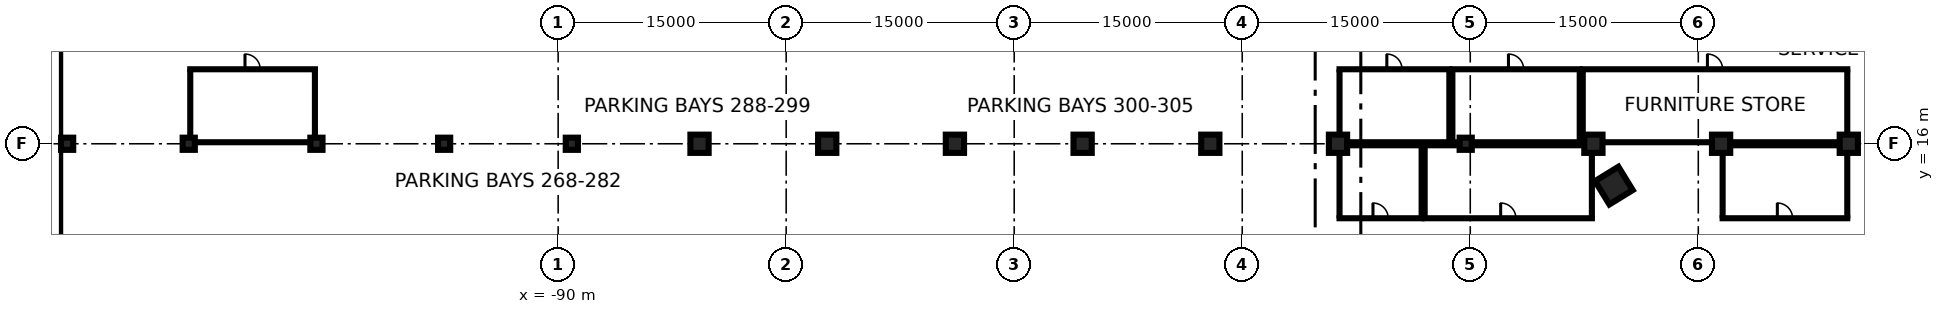
"""IFC4 building model, lengths in metres.
Left out: names, types, materials, properties, quantities, classifications, styles, units other than length and angle.
Written with IfcOpenShell. Run it as: python <this file> out.ifc"""

import sys

from ifc_helpers import new_model, si_unit, direction, frame, frame_2d, origin, origin_2d, place, context, subcontext, project, spatial, rectangle, extrude, element, fill, save


model = new_model("IFC4")
c1 = context("Model", 3, precision=1e-05, world=origin(), true_north=direction((0.0, 1.0)))
c2 = subcontext(c1, "Body", "Model", "MODEL_VIEW")
j1 = project(units=[si_unit("LENGTHUNIT", "METRE"), si_unit("PLANEANGLEUNIT", "RADIAN")], contexts=[c1])
p1 = place(None, origin())
s1 = spatial("IfcSite", under=j1, at=p1, CompositionType="ELEMENT")
p2 = place(p1, origin())
s2 = spatial("IfcBuilding", under=s1, at=p2, CompositionType="ELEMENT")
p3 = place(p2, frame((0.0, 0.0, -12.0)))
s3 = spatial("IfcBuildingStorey", under=s2, at=p3, CompositionType="ELEMENT", Elevation=-12.0)
p4 = place(p3, frame((-123.15, -80.0, 0.0), z_axis=(0.0, 0.0, 1.0), x_axis=(0.0, 1.0, 0.0)))
e1 = element("IfcWall", 1, at=p4, inside=s3, PredefinedType="USERDEFINED", context=c2, shape_type="SweptSolid", body=[
    extrude(rectangle(XDim=160.0, YDim=0.9, at=frame_2d((80.0, 0.0))), origin(), (0.0, 0.0, 1.0), 11.55),
])
p5 = place(p2, frame((0.0, 0.0, -3.6)))
s4 = spatial("IfcBuildingStorey", under=s2, at=p5, CompositionType="ELEMENT", Elevation=-3.6)
p6 = place(p5, frame((-20.552, 13.248, -0.4), z_axis=(0.0, 0.0, 1.0), x_axis=(-0.523429826947, 0.85206878611, 0.0)))
e2 = element("IfcColumn", 2, at=p6, inside=s4, PredefinedType="COLUMN", context=c2, shape_type="SweptSolid", body=[
    extrude(rectangle(XDim=1.8, YDim=1.8, at=origin_2d()), origin(), (0.0, 0.0, 1.0), 3.55),
])
for number, where, z_axis, x_axis in (
    (3, (-122.3, 16.0, -0.4), (0.0, 0.0, 1.0), (1.0, 0.0, 0.0)),
    (4, (-114.3, 16.0, -0.4), (0.0, 0.0, 1.0), (1.0, 0.0, 0.0)),
    (5, (-105.9, 16.0, -0.4), (0.0, 0.0, 1.0), (1.0, 0.0, 0.0)),
    (6, (-97.5, 16.0, -0.4), (0.0, 0.0, 1.0), (1.0, 0.0, 0.0)),
    (7, (-89.1, 16.0, -0.4), (0.0, 0.0, 1.0), (1.0, 0.0, 0.0)),
):
    element("IfcColumn", number, at=place(p5, frame(where, z_axis=z_axis, x_axis=x_axis)), inside=s4, PredefinedType="COLUMN", context=c2, shape_type="SweptSolid", body=[
        extrude(rectangle(XDim=0.8, YDim=0.8, at=origin_2d()), origin(), (0.0, 0.0, 1.0), 3.55),
    ])
for number, where, z_axis, x_axis in (
    (8, (-80.7, 16.0, -0.4), (0.0, 0.0, 1.0), (1.0, 0.0, 0.0)),
    (9, (-72.3, 16.0, -0.4), (0.0, 0.0, 1.0), (1.0, 0.0, 0.0)),
    (10, (-63.9, 16.0, -0.4), (0.0, 0.0, 1.0), (1.0, 0.0, 0.0)),
    (11, (-55.5, 16.0, -0.4), (0.0, 0.0, 1.0), (1.0, 0.0, 0.0)),
    (12, (-47.1, 16.0, -0.4), (0.0, 0.0, 1.0), (1.0, 0.0, 0.0)),
    (13, (-38.7, 16.0, -0.4), (0.0, 0.0, 1.0), (1.0, 0.0, 0.0)),
):
    element("IfcColumn", number, at=place(p5, frame(where, z_axis=z_axis, x_axis=x_axis)), inside=s4, PredefinedType="COLUMN", context=c2, shape_type="SweptSolid", body=[
        extrude(rectangle(XDim=1.2, YDim=1.2, at=origin_2d()), origin(), (0.0, 0.0, 1.0), 3.55),
    ])
p7 = place(p5, frame((-30.3, 16.0, -0.4), z_axis=(0.0, 0.0, 1.0), x_axis=(1.0, 0.0, 0.0)))
e14 = element("IfcColumn", 14, at=p7, inside=s4, PredefinedType="COLUMN", context=c2, shape_type="SweptSolid", body=[
    extrude(rectangle(XDim=0.8, YDim=0.8, at=origin_2d()), origin(), (0.0, 0.0, 1.0), 3.55),
])
for number, where, z_axis, x_axis in (
    (15, (-21.9, 16.0, -0.4), (0.0, 0.0, 1.0), (1.0, 0.0, 0.0)),
    (16, (-13.5, 16.0, -0.4), (0.0, 0.0, 1.0), (1.0, 0.0, 0.0)),
    (17, (-5.1, 16.0, -0.4), (0.0, 0.0, 1.0), (1.0, 0.0, 0.0)),
):
    element("IfcColumn", number, at=place(p5, frame(where, z_axis=z_axis, x_axis=x_axis)), inside=s4, PredefinedType="COLUMN", context=c2, shape_type="SweptSolid", body=[
        extrude(rectangle(XDim=1.2, YDim=1.2, at=origin_2d()), origin(), (0.0, 0.0, 1.0), 3.55),
    ])
p8 = place(p5, frame((-38.7, 11.1, 0.0), z_axis=(0.0, 0.0, 1.0), x_axis=(1.0, 0.0, 0.0)))
e18 = element("IfcWall", 18, at=p8, inside=s4, PredefinedType="PARTITIONING", context=c2, shape_type="SweptSolid", body=[
    extrude(rectangle(XDim=5.6, YDim=0.2, at=frame_2d((2.8, 0.0))), origin(), (0.0, 0.0, 1.0), 3.15),
])
p9 = place(p8, frame((2.3, 0.0, 0.0)))
e19 = element("IfcOpeningElement", 19, at=p9, cuts=e18, PredefinedType="OPENING", context=c2, shape_type="SweptSolid", body=[
    extrude(rectangle(XDim=1.0, YDim=2.1, at=frame_2d((0.5, 1.05))), frame((0.0, 0.11, 0.0), z_axis=(0.0, -1.0, 0.0), x_axis=(1.0, 0.0, 0.0)), (0.0, 0.0, 1.0), 0.22),
])
p10 = place(p5, frame((-38.7, 15.9, 0.0), z_axis=(0.0, 0.0, 1.0), x_axis=(1.0, 0.0, 0.0)))
e20 = element("IfcWall", 20, at=p10, inside=s4, PredefinedType="PARTITIONING", context=c2, shape_type="SweptSolid", body=[
    extrude(rectangle(XDim=5.6, YDim=0.2, at=frame_2d((2.8, 0.0))), origin(), (0.0, 0.0, 1.0), 3.15),
])
p11 = place(p5, frame((-38.6, 11.2, 0.0), z_axis=(0.0, 0.0, 1.0), x_axis=(0.0, 1.0, 0.0)))
e21 = element("IfcWall", 21, at=p11, inside=s4, PredefinedType="PARTITIONING", context=c2, shape_type="SweptSolid", body=[
    extrude(rectangle(XDim=4.2, YDim=0.2, at=frame_2d((2.1, 0.0))), origin(), (0.0, 0.0, 1.0), 3.15),
])
p12 = place(p5, frame((-33.2, 11.2, 0.0), z_axis=(0.0, 0.0, 1.0), x_axis=(0.0, 1.0, 0.0)))
e22 = element("IfcWall", 22, at=p12, inside=s4, PredefinedType="PARTITIONING", context=c2, shape_type="SweptSolid", body=[
    extrude(rectangle(XDim=4.6, YDim=0.2, at=frame_2d((2.3, 0.0))), origin(), (0.0, 0.0, 1.0), 3.15),
])
p13 = place(p5, frame((-33.1, 11.1, 0.0), z_axis=(0.0, 0.0, 1.0), x_axis=(1.0, 0.0, 0.0)))
e23 = element("IfcWall", 23, at=p13, inside=s4, PredefinedType="PARTITIONING", context=c2, shape_type="SweptSolid", body=[
    extrude(rectangle(XDim=11.2, YDim=0.2, at=frame_2d((5.6, 0.0))), origin(), (0.0, 0.0, 1.0), 3.15),
])
p14 = place(p13, frame((5.1, 0.0, 0.0)))
e24 = element("IfcOpeningElement", 24, at=p14, cuts=e23, PredefinedType="OPENING", context=c2, shape_type="SweptSolid", body=[
    extrude(rectangle(XDim=1.0, YDim=2.1, at=frame_2d((0.5, 1.05))), frame((0.0, 0.11, 0.0), z_axis=(0.0, -1.0, 0.0), x_axis=(1.0, 0.0, 0.0)), (0.0, 0.0, 1.0), 0.22),
])
p15 = place(p5, frame((-33.1, 15.9, 0.0), z_axis=(0.0, 0.0, 1.0), x_axis=(1.0, 0.0, 0.0)))
e25 = element("IfcWall", 25, at=p15, inside=s4, PredefinedType="PARTITIONING", context=c2, shape_type="SweptSolid", body=[
    extrude(rectangle(XDim=11.2, YDim=0.2, at=frame_2d((5.6, 0.0))), origin(), (0.0, 0.0, 1.0), 3.15),
])
p16 = place(p5, frame((-33.0, 11.2, 0.0), z_axis=(0.0, 0.0, 1.0), x_axis=(0.0, 1.0, 0.0)))
e26 = element("IfcWall", 26, at=p16, inside=s4, PredefinedType="PARTITIONING", context=c2, shape_type="SweptSolid", body=[
    extrude(rectangle(XDim=4.6, YDim=0.2, at=frame_2d((2.3, 0.0))), origin(), (0.0, 0.0, 1.0), 3.15),
])
p17 = place(p5, frame((-22.0, 11.2, 0.0), z_axis=(0.0, 0.0, 1.0), x_axis=(0.0, 1.0, 0.0)))
e27 = element("IfcWall", 27, at=p17, inside=s4, PredefinedType="PARTITIONING", context=c2, shape_type="SweptSolid", body=[
    extrude(rectangle(XDim=4.2, YDim=0.2, at=frame_2d((2.1, 0.0))), origin(), (0.0, 0.0, 1.0), 3.15),
])
p18 = place(p5, frame((-13.5, 11.1, 0.0), z_axis=(0.0, 0.0, 1.0), x_axis=(1.0, 0.0, 0.0)))
e28 = element("IfcWall", 28, at=p18, inside=s4, PredefinedType="PARTITIONING", context=c2, shape_type="SweptSolid", body=[
    extrude(rectangle(XDim=8.4, YDim=0.2, at=frame_2d((4.2, 0.0))), origin(), (0.0, 0.0, 1.0), 3.15),
])
p19 = place(p18, frame((3.7, 0.0, 0.0)))
e29 = element("IfcOpeningElement", 29, at=p19, cuts=e28, PredefinedType="OPENING", context=c2, shape_type="SweptSolid", body=[
    extrude(rectangle(XDim=1.0, YDim=2.1, at=frame_2d((0.5, 1.05))), frame((0.0, 0.11, 0.0), z_axis=(0.0, -1.0, 0.0), x_axis=(1.0, 0.0, 0.0)), (0.0, 0.0, 1.0), 0.22),
])
p20 = place(p5, frame((-13.5, 15.9, 0.0), z_axis=(0.0, 0.0, 1.0), x_axis=(1.0, 0.0, 0.0)))
e30 = element("IfcWall", 30, at=p20, inside=s4, PredefinedType="PARTITIONING", context=c2, shape_type="SweptSolid", body=[
    extrude(rectangle(XDim=8.4, YDim=0.2, at=frame_2d((4.2, 0.0))), origin(), (0.0, 0.0, 1.0), 3.15),
])
for number, where, z_axis, x_axis in (
    (31, (-13.4, 11.2, 0.0), (0.0, 0.0, 1.0), (0.0, 1.0, 0.0)),
    (32, (-5.2, 11.2, 0.0), (0.0, 0.0, 1.0), (0.0, 1.0, 0.0)),
):
    element("IfcWall", number, at=place(p5, frame(where, z_axis=z_axis, x_axis=x_axis)), inside=s4, PredefinedType="PARTITIONING", context=c2, shape_type="SweptSolid", body=[
        extrude(rectangle(XDim=4.2, YDim=0.2, at=frame_2d((2.1, 0.0))), origin(), (0.0, 0.0, 1.0), 3.15),
    ])
p21 = place(p5, frame((-38.7, 16.1, 0.0), z_axis=(0.0, 0.0, 1.0), x_axis=(1.0, 0.0, 0.0)))
e33 = element("IfcWall", 33, at=p21, inside=s4, PredefinedType="PARTITIONING", context=c2, shape_type="SweptSolid", body=[
    extrude(rectangle(XDim=7.423, YDim=0.2, at=frame_2d((3.712, 0.0))), origin(), (0.0, 0.0, 1.0), 3.15),
])
p22 = place(p5, frame((-38.7, 20.9, 0.0), z_axis=(0.0, 0.0, 1.0), x_axis=(1.0, 0.0, 0.0)))
e34 = element("IfcWall", 34, at=p22, inside=s4, PredefinedType="PARTITIONING", context=c2, shape_type="SweptSolid", body=[
    extrude(rectangle(XDim=7.423, YDim=0.2, at=frame_2d((3.712, 0.0))), origin(), (0.0, 0.0, 1.0), 3.15),
])
p23 = place(p22, frame((3.212, 0.0, 0.0)))
e35 = element("IfcOpeningElement", 35, at=p23, cuts=e34, PredefinedType="OPENING", context=c2, shape_type="SweptSolid", body=[
    extrude(rectangle(XDim=1.0, YDim=2.1, at=frame_2d((0.5, 1.05))), frame((0.0, 0.11, 0.0), z_axis=(0.0, -1.0, 0.0), x_axis=(1.0, 0.0, 0.0)), (0.0, 0.0, 1.0), 0.22),
])
p24 = place(p5, frame((-38.6, 16.6, 0.0), z_axis=(0.0, 0.0, 1.0), x_axis=(0.0, 1.0, 0.0)))
e36 = element("IfcWall", 36, at=p24, inside=s4, PredefinedType="PARTITIONING", context=c2, shape_type="SweptSolid", body=[
    extrude(rectangle(XDim=4.2, YDim=0.2, at=frame_2d((2.1, 0.0))), origin(), (0.0, 0.0, 1.0), 3.15),
])
p25 = place(p5, frame((-31.377, 16.2, 0.0), z_axis=(0.0, 0.0, 1.0), x_axis=(0.0, 1.0, 0.0)))
e37 = element("IfcWall", 37, at=p25, inside=s4, PredefinedType="PARTITIONING", context=c2, shape_type="SweptSolid", body=[
    extrude(rectangle(XDim=4.6, YDim=0.2, at=frame_2d((2.3, 0.0))), origin(), (0.0, 0.0, 1.0), 3.15),
])
p26 = place(p5, frame((-31.277, 16.1, 0.0), z_axis=(0.0, 0.0, 1.0), x_axis=(1.0, 0.0, 0.0)))
e38 = element("IfcWall", 38, at=p26, inside=s4, PredefinedType="PARTITIONING", context=c2, shape_type="SweptSolid", body=[
    extrude(rectangle(XDim=8.577, YDim=0.2, at=frame_2d((4.288, 0.0))), origin(), (0.0, 0.0, 1.0), 3.15),
])
p27 = place(p5, frame((-31.277, 20.9, 0.0), z_axis=(0.0, 0.0, 1.0), x_axis=(1.0, 0.0, 0.0)))
e39 = element("IfcWall", 39, at=p27, inside=s4, PredefinedType="PARTITIONING", context=c2, shape_type="SweptSolid", body=[
    extrude(rectangle(XDim=8.577, YDim=0.2, at=frame_2d((4.288, 0.0))), origin(), (0.0, 0.0, 1.0), 3.15),
])
p28 = place(p27, frame((3.788, 0.0, 0.0)))
e40 = element("IfcOpeningElement", 40, at=p28, cuts=e39, PredefinedType="OPENING", context=c2, shape_type="SweptSolid", body=[
    extrude(rectangle(XDim=1.0, YDim=2.1, at=frame_2d((0.5, 1.05))), frame((0.0, 0.11, 0.0), z_axis=(0.0, -1.0, 0.0), x_axis=(1.0, 0.0, 0.0)), (0.0, 0.0, 1.0), 0.22),
])
for number, where, z_axis, x_axis in (
    (41, (-31.177, 16.2, 0.0), (0.0, 0.0, 1.0), (0.0, 1.0, 0.0)),
    (42, (-22.8, 16.2, 0.0), (0.0, 0.0, 1.0), (0.0, 1.0, 0.0)),
):
    element("IfcWall", number, at=place(p5, frame(where, z_axis=z_axis, x_axis=x_axis)), inside=s4, PredefinedType="PARTITIONING", context=c2, shape_type="SweptSolid", body=[
        extrude(rectangle(XDim=4.6, YDim=0.2, at=frame_2d((2.3, 0.0))), origin(), (0.0, 0.0, 1.0), 3.15),
    ])
p29 = place(p5, frame((-22.7, 16.1, 0.0), z_axis=(0.0, 0.0, 1.0), x_axis=(1.0, 0.0, 0.0)))
e43 = element("IfcWall", 43, at=p29, inside=s4, PredefinedType="PARTITIONING", context=c2, shape_type="SweptSolid", body=[
    extrude(rectangle(XDim=17.6, YDim=0.2, at=frame_2d((8.8, 0.0))), origin(), (0.0, 0.0, 1.0), 3.15),
])
p30 = place(p5, frame((-22.7, 20.9, 0.0), z_axis=(0.0, 0.0, 1.0), x_axis=(1.0, 0.0, 0.0)))
e44 = element("IfcWall", 44, at=p30, inside=s4, PredefinedType="PARTITIONING", context=c2, shape_type="SweptSolid", body=[
    extrude(rectangle(XDim=17.6, YDim=0.2, at=frame_2d((8.8, 0.0))), origin(), (0.0, 0.0, 1.0), 3.15),
])
p31 = place(p30, frame((8.3, 0.0, 0.0)))
e45 = element("IfcOpeningElement", 45, at=p31, cuts=e44, PredefinedType="OPENING", context=c2, shape_type="SweptSolid", body=[
    extrude(rectangle(XDim=1.0, YDim=2.1, at=frame_2d((0.5, 1.05))), frame((0.0, 0.11, 0.0), z_axis=(0.0, -1.0, 0.0), x_axis=(1.0, 0.0, 0.0)), (0.0, 0.0, 1.0), 0.22),
])
p32 = place(p5, frame((-22.6, 16.2, 0.0), z_axis=(0.0, 0.0, 1.0), x_axis=(0.0, 1.0, 0.0)))
e46 = element("IfcWall", 46, at=p32, inside=s4, PredefinedType="PARTITIONING", context=c2, shape_type="SweptSolid", body=[
    extrude(rectangle(XDim=4.6, YDim=0.2, at=frame_2d((2.3, 0.0))), origin(), (0.0, 0.0, 1.0), 3.15),
])
p33 = place(p5, frame((-5.2, 16.6, 0.0), z_axis=(0.0, 0.0, 1.0), x_axis=(0.0, 1.0, 0.0)))
e47 = element("IfcWall", 47, at=p33, inside=s4, PredefinedType="PARTITIONING", context=c2, shape_type="SweptSolid", body=[
    extrude(rectangle(XDim=4.2, YDim=0.2, at=frame_2d((2.1, 0.0))), origin(), (0.0, 0.0, 1.0), 3.15),
])
p34 = place(p5, frame((-114.3, 16.1, 0.0), z_axis=(0.0, 0.0, 1.0), x_axis=(1.0, 0.0, 0.0)))
e48 = element("IfcWall", 48, at=p34, inside=s4, PredefinedType="PARTITIONING", context=c2, shape_type="SweptSolid", body=[
    extrude(rectangle(XDim=8.4, YDim=0.2, at=frame_2d((4.2, 0.0))), origin(), (0.0, 0.0, 1.0), 3.15),
])
p35 = place(p5, frame((-114.3, 20.9, 0.0), z_axis=(0.0, 0.0, 1.0), x_axis=(1.0, 0.0, 0.0)))
e49 = element("IfcWall", 49, at=p35, inside=s4, PredefinedType="PARTITIONING", context=c2, shape_type="SweptSolid", body=[
    extrude(rectangle(XDim=8.4, YDim=0.2, at=frame_2d((4.2, 0.0))), origin(), (0.0, 0.0, 1.0), 3.15),
])
p36 = place(p35, frame((3.7, 0.0, 0.0)))
e50 = element("IfcOpeningElement", 50, at=p36, cuts=e49, PredefinedType="OPENING", context=c2, shape_type="SweptSolid", body=[
    extrude(rectangle(XDim=1.0, YDim=2.1, at=frame_2d((0.5, 1.05))), frame((0.0, 0.11, 0.0), z_axis=(0.0, -1.0, 0.0), x_axis=(1.0, 0.0, 0.0)), (0.0, 0.0, 1.0), 0.22),
])
for number, where, z_axis, x_axis in (
    (51, (-114.2, 16.4, 0.0), (0.0, 0.0, 1.0), (0.0, 1.0, 0.0)),
    (52, (-106.0, 16.4, 0.0), (0.0, 0.0, 1.0), (0.0, 1.0, 0.0)),
):
    element("IfcWall", number, at=place(p5, frame(where, z_axis=z_axis, x_axis=x_axis)), inside=s4, PredefinedType="PARTITIONING", context=c2, shape_type="SweptSolid", body=[
        extrude(rectangle(XDim=4.4, YDim=0.2, at=frame_2d((2.2, 0.0))), origin(), (0.0, 0.0, 1.0), 3.15),
    ])
p37 = place(p9, origin())
e53 = element("IfcDoor", 53, at=p37, inside=s4, OperationType="SINGLE_SWING_LEFT", PredefinedType="DOOR", context=c2, shape_type="SweptSolid", body=[
    extrude(rectangle(XDim=1.0, YDim=2.1, at=frame_2d((0.5, 1.05))), frame((0.0, 0.025, 0.0), z_axis=(0.0, -1.0, 0.0), x_axis=(1.0, 0.0, 0.0)), (0.0, 0.0, 1.0), 0.05),
])
fill(e19, e53)
p38 = place(p14, origin())
e54 = element("IfcDoor", 54, at=p38, inside=s4, OperationType="SINGLE_SWING_LEFT", PredefinedType="DOOR", context=c2, shape_type="SweptSolid", body=[
    extrude(rectangle(XDim=1.0, YDim=2.1, at=frame_2d((0.5, 1.05))), frame((0.0, 0.025, 0.0), z_axis=(0.0, -1.0, 0.0), x_axis=(1.0, 0.0, 0.0)), (0.0, 0.0, 1.0), 0.05),
])
fill(e24, e54)
p39 = place(p19, origin())
e55 = element("IfcDoor", 55, at=p39, inside=s4, OperationType="SINGLE_SWING_LEFT", PredefinedType="DOOR", context=c2, shape_type="SweptSolid", body=[
    extrude(rectangle(XDim=1.0, YDim=2.1, at=frame_2d((0.5, 1.05))), frame((0.0, 0.025, 0.0), z_axis=(0.0, -1.0, 0.0), x_axis=(1.0, 0.0, 0.0)), (0.0, 0.0, 1.0), 0.05),
])
fill(e29, e55)
p40 = place(p23, origin())
e56 = element("IfcDoor", 56, at=p40, inside=s4, OperationType="SINGLE_SWING_LEFT", PredefinedType="DOOR", context=c2, shape_type="SweptSolid", body=[
    extrude(rectangle(XDim=1.0, YDim=2.1, at=frame_2d((0.5, 1.05))), frame((0.0, 0.025, 0.0), z_axis=(0.0, -1.0, 0.0), x_axis=(1.0, 0.0, 0.0)), (0.0, 0.0, 1.0), 0.05),
])
fill(e35, e56)
p41 = place(p28, origin())
e57 = element("IfcDoor", 57, at=p41, inside=s4, OperationType="SINGLE_SWING_LEFT", PredefinedType="DOOR", context=c2, shape_type="SweptSolid", body=[
    extrude(rectangle(XDim=1.0, YDim=2.1, at=frame_2d((0.5, 1.05))), frame((0.0, 0.025, 0.0), z_axis=(0.0, -1.0, 0.0), x_axis=(1.0, 0.0, 0.0)), (0.0, 0.0, 1.0), 0.05),
])
fill(e40, e57)
p42 = place(p31, origin())
e58 = element("IfcDoor", 58, at=p42, inside=s4, OperationType="SINGLE_SWING_LEFT", PredefinedType="DOOR", context=c2, shape_type="SweptSolid", body=[
    extrude(rectangle(XDim=1.0, YDim=2.1, at=frame_2d((0.5, 1.05))), frame((0.0, 0.025, 0.0), z_axis=(0.0, -1.0, 0.0), x_axis=(1.0, 0.0, 0.0)), (0.0, 0.0, 1.0), 0.05),
])
fill(e45, e58)
p43 = place(p36, origin())
e59 = element("IfcDoor", 59, at=p43, inside=s4, OperationType="SINGLE_SWING_LEFT", PredefinedType="DOOR", context=c2, shape_type="SweptSolid", body=[
    extrude(rectangle(XDim=1.0, YDim=2.1, at=frame_2d((0.5, 1.05))), frame((0.0, 0.025, 0.0), z_axis=(0.0, -1.0, 0.0), x_axis=(1.0, 0.0, 0.0)), (0.0, 0.0, 1.0), 0.05),
])
fill(e50, e59)
save(model, sys.argv[1])
